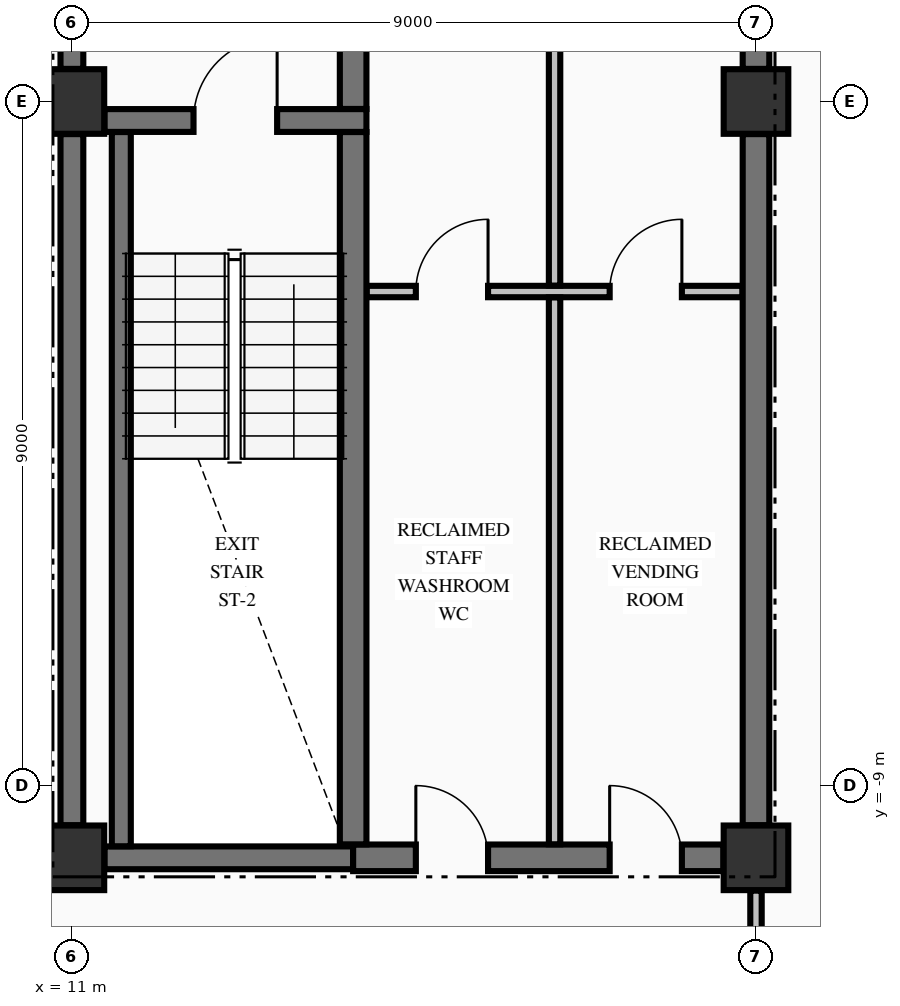
"""IFC4 building model, lengths in metres.
Left out: names, types, materials, properties, quantities, classifications, styles, units other than length and angle.
Written with IfcOpenShell. Run it as: python <this file> out.ifc"""

import sys

from ifc_helpers import new_model, si_unit, direction, frame, frame_2d, origin, origin_2d, place, context, subcontext, project, spatial, rectangle, extrude, element, fill, save


model = new_model("IFC4")
c1 = context("Model", 3, precision=1e-05, world=origin(), true_north=direction((0.0, 1.0)))
c2 = subcontext(c1, "Body", "Model", "MODEL_VIEW")
j1 = project(units=[si_unit("LENGTHUNIT", "METRE"), si_unit("PLANEANGLEUNIT", "RADIAN")], contexts=[c1])
p1 = place(None, origin())
s1 = spatial("IfcSite", under=j1, at=p1, CompositionType="ELEMENT")
p2 = place(p1, origin())
s2 = spatial("IfcBuilding", under=s1, at=p2, CompositionType="ELEMENT")
p3 = place(p2, frame((0.0, 0.0, 215.26)))
s3 = spatial("IfcBuildingStorey", under=s2, at=p3, CompositionType="ELEMENT", Elevation=215.26)
for number, where, z_axis, x_axis in (
    (1, (11.0, -9.95, -0.25), (0.0, 0.0, 1.0), (1.0, 0.0, 0.0)),
    (2, (11.0, 0.0, -0.25), (0.0, 0.0, 1.0), (1.0, 0.0, 0.0)),
    (3, (20.0, -9.95, -0.25), (0.0, 0.0, 1.0), (1.0, 0.0, 0.0)),
    (4, (20.0, 0.0, -0.25), (0.0, 0.0, 1.0), (1.0, 0.0, 0.0)),
):
    element("IfcColumn", number, at=place(p3, frame(where, z_axis=z_axis, x_axis=x_axis)), inside=s3, PredefinedType="COLUMN", context=c2, shape_type="SweptSolid", body=[
        extrude(rectangle(XDim=0.85, YDim=0.85, at=origin_2d()), origin(), (0.0, 0.0, 1.0), 3.4),
    ])
p4 = place(p3, frame((11.429, -9.95, 0.0), z_axis=(0.0, 0.0, 1.0), x_axis=(1.0, 0.0, 0.0)))
e5 = element("IfcWall", 5, at=p4, inside=s3, PredefinedType="SHEAR", context=c2, shape_type="SweptSolid", body=[
    extrude(rectangle(XDim=3.271, YDim=0.3, at=frame_2d((1.635, 0.0))), origin(), (0.0, 0.0, 1.0), 3.15),
])
p5 = place(p3, frame((14.7, -9.95, 0.0), z_axis=(0.0, 0.0, 1.0), x_axis=(1.0, 0.0, 0.0)))
e6 = element("IfcWall", 6, at=p5, inside=s3, PredefinedType="SHEAR", context=c2, shape_type="SweptSolid", body=[
    extrude(rectangle(XDim=4.871, YDim=0.35, at=frame_2d((2.436, 0.0))), origin(), (0.0, 0.0, 1.0), 3.15),
])
p6 = place(p5, frame((0.825, 0.0, 0.0)))
e7 = element("IfcOpeningElement", 7, at=p6, cuts=e6, PredefinedType="OPENING", context=c2, shape_type="SweptSolid", body=[
    extrude(rectangle(XDim=0.95, YDim=2.15, at=frame_2d((0.475, 1.075))), frame((0.0, 0.185, 0.0), z_axis=(0.0, -1.0, 0.0), x_axis=(1.0, 0.0, 0.0)), (0.0, 0.0, 1.0), 0.37),
])
p7 = place(p5, frame((3.375, 0.0, 0.0)))
e8 = element("IfcOpeningElement", 8, at=p7, cuts=e6, PredefinedType="OPENING", context=c2, shape_type="SweptSolid", body=[
    extrude(rectangle(XDim=0.95, YDim=2.15, at=frame_2d((0.475, 1.075))), frame((0.0, 0.185, 0.0), z_axis=(0.0, -1.0, 0.0), x_axis=(1.0, 0.0, 0.0)), (0.0, 0.0, 1.0), 0.37),
])
p8 = place(p3, frame((11.429, -0.25, 0.0), z_axis=(0.0, 0.0, 1.0), x_axis=(1.0, 0.0, 0.0)))
e9 = element("IfcWall", 9, at=p8, inside=s3, PredefinedType="SHEAR", context=c2, shape_type="SweptSolid", body=[
    extrude(rectangle(XDim=3.446, YDim=0.3, at=frame_2d((1.723, 0.0))), origin(), (0.0, 0.0, 1.0), 3.15),
])
p9 = place(p8, frame((1.171, 0.0, 0.0)))
e10 = element("IfcOpeningElement", 10, at=p9, cuts=e9, PredefinedType="OPENING", context=c2, shape_type="SweptSolid", body=[
    extrude(rectangle(XDim=1.1, YDim=2.15, at=frame_2d((0.55, 1.075))), frame((0.0, 0.16, 0.0), z_axis=(0.0, -1.0, 0.0), x_axis=(1.0, 0.0, 0.0)), (0.0, 0.0, 1.0), 0.32),
])
p10 = place(p3, frame((14.878, -2.5, 0.0), z_axis=(0.0, 0.0, 1.0), x_axis=(1.0, 0.0, 0.0)))
e11 = element("IfcWall", 11, at=p10, inside=s3, PredefinedType="PARTITIONING", context=c2, shape_type="SweptSolid", body=[
    extrude(rectangle(XDim=4.944, YDim=0.15, at=frame_2d((2.472, 0.0))), origin(), (0.0, 0.0, 1.0), 3.15),
])
p11 = place(p10, frame((0.647, 0.0, 0.0)))
e12 = element("IfcOpeningElement", 12, at=p11, cuts=e11, PredefinedType="OPENING", context=c2, shape_type="SweptSolid", body=[
    extrude(rectangle(XDim=0.95, YDim=2.15, at=frame_2d((0.475, 1.075))), frame((0.0, 0.085, 0.0), z_axis=(0.0, -1.0, 0.0), x_axis=(1.0, 0.0, 0.0)), (0.0, 0.0, 1.0), 0.17),
])
p12 = place(p10, frame((3.197, 0.0, 0.0)))
e13 = element("IfcOpeningElement", 13, at=p12, cuts=e11, PredefinedType="OPENING", context=c2, shape_type="SweptSolid", body=[
    extrude(rectangle(XDim=0.95, YDim=2.15, at=frame_2d((0.475, 1.075))), frame((0.0, 0.085, 0.0), z_axis=(0.0, -1.0, 0.0), x_axis=(1.0, 0.0, 0.0)), (0.0, 0.0, 1.0), 0.17),
])
p13 = place(p3, frame((11.0, -9.521, 0.0), z_axis=(0.0, 0.0, 1.0), x_axis=(0.0, 1.0, 0.0)))
e14 = element("IfcWall", 14, at=p13, inside=s3, PredefinedType="SHEAR", context=c2, shape_type="SweptSolid", body=[
    extrude(rectangle(XDim=9.092, YDim=0.3, at=frame_2d((4.546, 0.0))), origin(), (0.0, 0.0, 1.0), 3.15),
])
p14 = place(p3, frame((11.0, 0.429, 0.0), z_axis=(0.0, 0.0, 1.0), x_axis=(0.0, 1.0, 0.0)))
e15 = element("IfcWall", 15, at=p14, inside=s3, PredefinedType="SHEAR", context=c2, shape_type="SweptSolid", body=[
    extrude(rectangle(XDim=2.319, YDim=0.3, at=frame_2d((1.16, 0.0))), origin(), (0.0, 0.0, 1.0), 3.15),
])
p15 = place(p14, frame((0.671, 0.0, 0.0)))
e16 = element("IfcOpeningElement", 16, at=p15, cuts=e15, PredefinedType="OPENING", context=c2, shape_type="SweptSolid", body=[
    extrude(rectangle(XDim=1.1, YDim=2.15, at=frame_2d((0.55, 1.075))), frame((0.0, 0.16, 0.0), z_axis=(0.0, -1.0, 0.0), x_axis=(1.0, 0.0, 0.0)), (0.0, 0.0, 1.0), 0.32),
])
p16 = place(p3, frame((11.65, -9.798, 0.0), z_axis=(0.0, 0.0, 1.0), x_axis=(0.0, 1.0, 0.0)))
e17 = element("IfcWall", 17, at=p16, inside=s3, PredefinedType="SOLIDWALL", context=c2, shape_type="SweptSolid", body=[
    extrude(rectangle(XDim=9.396, YDim=0.25, at=frame_2d((4.698, 0.0))), origin(), (0.0, 0.0, 1.0), 3.15),
])
p17 = place(p3, frame((14.7, -9.773, 0.0), z_axis=(0.0, 0.0, 1.0), x_axis=(0.0, 1.0, 0.0)))
e18 = element("IfcWall", 18, at=p17, inside=s3, PredefinedType="SHEAR", context=c2, shape_type="SweptSolid", body=[
    extrude(rectangle(XDim=9.371, YDim=0.35, at=frame_2d((4.686, 0.0))), origin(), (0.0, 0.0, 1.0), 3.15),
])
p18 = place(p3, frame((14.7, -0.098, 0.0), z_axis=(0.0, 0.0, 1.0), x_axis=(0.0, 1.0, 0.0)))
e19 = element("IfcWall", 19, at=p18, inside=s3, PredefinedType="SHEAR", context=c2, shape_type="SweptSolid", body=[
    extrude(rectangle(XDim=2.846, YDim=0.35, at=frame_2d((1.423, 0.0))), origin(), (0.0, 0.0, 1.0), 3.15),
])
p19 = place(p3, frame((20.0, -9.521, 0.0), z_axis=(0.0, 0.0, 1.0), x_axis=(0.0, 1.0, 0.0)))
e20 = element("IfcWall", 20, at=p19, inside=s3, PredefinedType="SHEAR", context=c2, shape_type="SweptSolid", body=[
    extrude(rectangle(XDim=9.092, YDim=0.35, at=frame_2d((4.546, 0.0))), origin(), (0.0, 0.0, 1.0), 3.15),
])
p20 = place(p3, frame((20.0, 0.429, 0.0), z_axis=(0.0, 0.0, 1.0), x_axis=(0.0, 1.0, 0.0)))
e21 = element("IfcWall", 21, at=p20, inside=s3, PredefinedType="SHEAR", context=c2, shape_type="SweptSolid", body=[
    extrude(rectangle(XDim=4.744, YDim=0.35, at=frame_2d((2.372, 0.0))), origin(), (0.0, 0.0, 1.0), 3.15),
])
p21 = place(p3, frame((17.35, -9.772, 0.0), z_axis=(0.0, 0.0, 1.0), x_axis=(0.0, 1.0, 0.0)))
e22 = element("IfcWall", 22, at=p21, inside=s3, PredefinedType="PARTITIONING", context=c2, shape_type="SweptSolid", body=[
    extrude(rectangle(XDim=7.194, YDim=0.15, at=frame_2d((3.597, 0.0))), origin(), (0.0, 0.0, 1.0), 3.15),
])
p22 = place(p3, frame((17.35, -2.422, 0.0), z_axis=(0.0, 0.0, 1.0), x_axis=(0.0, 1.0, 0.0)))
e23 = element("IfcWall", 23, at=p22, inside=s3, PredefinedType="PARTITIONING", context=c2, shape_type="SweptSolid", body=[
    extrude(rectangle(XDim=7.144, YDim=0.15, at=frame_2d((3.572, 0.0))), origin(), (0.0, 0.0, 1.0), 3.15),
])
p23 = place(p3, frame((20.0, -12.722, 0.0), z_axis=(0.0, 0.0, 1.0), x_axis=(0.0, 1.0, 0.0)))
e24 = element("IfcWall", 24, at=p23, inside=s3, PredefinedType="PARTITIONING", context=c2, shape_type="SweptSolid", body=[
    extrude(rectangle(XDim=2.341, YDim=0.15, at=frame_2d((1.17, 0.0))), origin(), (0.0, 0.0, 1.0), 2.342),
])
p24 = place(p9, origin())
e25 = element("IfcDoor", 25, at=p24, inside=s3, OperationType="SINGLE_SWING_RIGHT", PredefinedType="DOOR", context=c2, shape_type="SweptSolid", body=[
    extrude(rectangle(XDim=1.1, YDim=2.15, at=frame_2d((0.55, 1.075))), frame((0.0, 0.025, 0.0), z_axis=(0.0, -1.0, 0.0), x_axis=(1.0, 0.0, 0.0)), (0.0, 0.0, 1.0), 0.05),
])
fill(e10, e25)
p25 = place(p6, origin())
e26 = element("IfcDoor", 26, at=p25, inside=s3, OperationType="SINGLE_SWING_LEFT", PredefinedType="DOOR", context=c2, shape_type="SweptSolid", body=[
    extrude(rectangle(XDim=0.95, YDim=2.15, at=frame_2d((0.475, 1.075))), frame((0.0, 0.025, 0.0), z_axis=(0.0, -1.0, 0.0), x_axis=(1.0, 0.0, 0.0)), (0.0, 0.0, 1.0), 0.05),
])
fill(e7, e26)
p26 = place(p11, origin())
e27 = element("IfcDoor", 27, at=p26, inside=s3, OperationType="SINGLE_SWING_RIGHT", PredefinedType="DOOR", context=c2, shape_type="SweptSolid", body=[
    extrude(rectangle(XDim=0.95, YDim=2.15, at=frame_2d((0.475, 1.075))), frame((0.0, 0.025, 0.0), z_axis=(0.0, -1.0, 0.0), x_axis=(1.0, 0.0, 0.0)), (0.0, 0.0, 1.0), 0.05),
])
fill(e12, e27)
p27 = place(p7, origin())
e28 = element("IfcDoor", 28, at=p27, inside=s3, OperationType="SINGLE_SWING_LEFT", PredefinedType="DOOR", context=c2, shape_type="SweptSolid", body=[
    extrude(rectangle(XDim=0.95, YDim=2.15, at=frame_2d((0.475, 1.075))), frame((0.0, 0.025, 0.0), z_axis=(0.0, -1.0, 0.0), x_axis=(1.0, 0.0, 0.0)), (0.0, 0.0, 1.0), 0.05),
])
fill(e8, e28)
p28 = place(p12, origin())
e29 = element("IfcDoor", 29, at=p28, inside=s3, OperationType="SINGLE_SWING_RIGHT", PredefinedType="DOOR", context=c2, shape_type="SweptSolid", body=[
    extrude(rectangle(XDim=0.95, YDim=2.15, at=frame_2d((0.475, 1.075))), frame((0.0, 0.025, 0.0), z_axis=(0.0, -1.0, 0.0), x_axis=(1.0, 0.0, 0.0)), (0.0, 0.0, 1.0), 0.05),
])
fill(e13, e29)
save(model, sys.argv[1])
